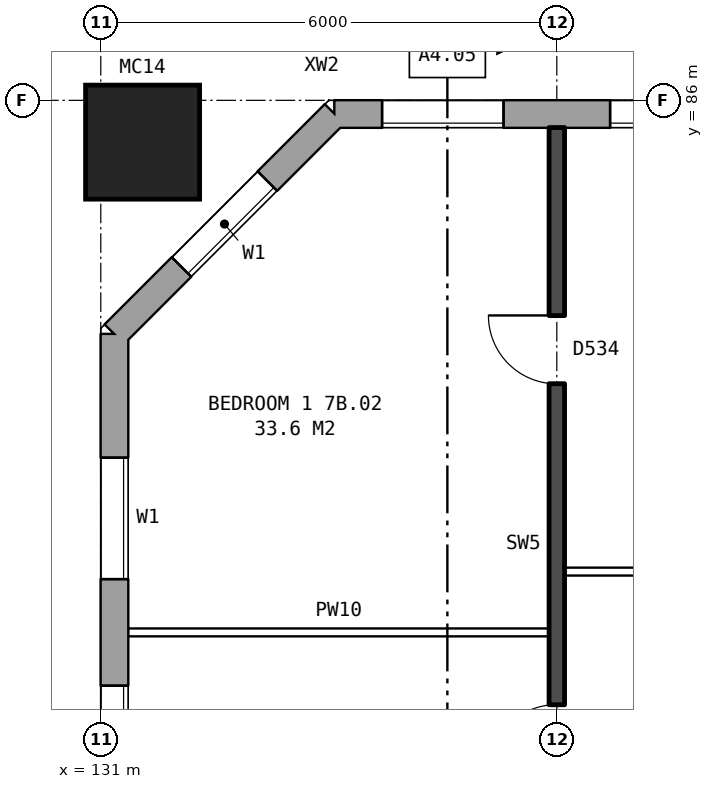
"""IFC4 building model, lengths in metres.
Left out: names, types, materials, properties, quantities, classifications, styles, units other than length and angle.
Written with IfcOpenShell. Run it as: python <this file> out.ifc"""

import sys

from ifc_helpers import new_model, si_unit, direction, frame, frame_2d, origin, origin_2d, place, context, subcontext, project, spatial, rectangle, hollow_rectangle, extrude, element, fill, save


model = new_model("IFC4")
c1 = context("Model", 3, precision=1e-05, world=origin(), true_north=direction((0.0, 1.0)))
c2 = subcontext(c1, "Body", "Model", "MODEL_VIEW")
j1 = project(units=[si_unit("LENGTHUNIT", "METRE"), si_unit("PLANEANGLEUNIT", "RADIAN")], contexts=[c1])
p1 = place(None, origin())
s1 = spatial("IfcSite", under=j1, at=p1, CompositionType="ELEMENT")
p2 = place(p1, origin())
s2 = spatial("IfcBuilding", under=s1, at=p2, CompositionType="ELEMENT")
p3 = place(p2, frame((0.0, 0.0, 28.8)))
s3 = spatial("IfcBuildingStorey", under=s2, at=p3, CompositionType="ELEMENT", Elevation=28.8)
p4 = place(p3, frame((131.55, 85.45, 0.0), z_axis=(0.0, 0.0, 1.0), x_axis=(1.0, 0.0, 0.0)))
e1 = element("IfcColumn", 1, at=p4, inside=s3, PredefinedType="COLUMN", context=c2, shape_type="SweptSolid", body=[
    extrude(hollow_rectangle(XDim=1.5, YDim=1.5, WallThickness=0.08, at=origin_2d()), origin(), (0.0, 0.0, 1.0), 3.1),
])
p5 = place(p3, frame((174.675, 85.82, 0.0), z_axis=(0.0, 0.0, 1.0), x_axis=(-1.0, 0.0, 0.0)))
e2 = element("IfcWall", 2, at=p5, inside=s3, PredefinedType="STANDARD", context=c2, shape_type="SweptSolid", body=[
    extrude(rectangle(XDim=40.601, YDim=0.36, at=frame_2d((20.3, 0.0))), origin(), (0.0, 0.0, 1.0), 2.85),
])
p6 = place(p5, frame((2.375, 0.0, 0.8)))
e3 = element("IfcOpeningElement", 3, at=p6, cuts=e2, PredefinedType="OPENING", context=c2, shape_type="SweptSolid", body=[
    extrude(rectangle(XDim=1.6, YDim=1.8, at=frame_2d((0.8, 0.9))), frame((0.0, 0.19, 0.0), z_axis=(0.0, -1.0, 0.0), x_axis=(1.0, 0.0, 0.0)), (0.0, 0.0, 1.0), 0.38),
])
p7 = place(p5, frame((5.375, 0.0, 0.8)))
e4 = element("IfcOpeningElement", 4, at=p7, cuts=e2, PredefinedType="OPENING", context=c2, shape_type="SweptSolid", body=[
    extrude(rectangle(XDim=1.6, YDim=1.8, at=frame_2d((0.8, 0.9))), frame((0.0, 0.19, 0.0), z_axis=(0.0, -1.0, 0.0), x_axis=(1.0, 0.0, 0.0)), (0.0, 0.0, 1.0), 0.38),
])
p8 = place(p5, frame((7.875, 0.0, 0.8)))
e5 = element("IfcOpeningElement", 5, at=p8, cuts=e2, PredefinedType="OPENING", context=c2, shape_type="SweptSolid", body=[
    extrude(rectangle(XDim=1.6, YDim=1.8, at=frame_2d((0.8, 0.9))), frame((0.0, 0.19, 0.0), z_axis=(0.0, -1.0, 0.0), x_axis=(1.0, 0.0, 0.0)), (0.0, 0.0, 1.0), 0.38),
])
p9 = place(p5, frame((9.775, 0.0, 1.7)))
e6 = element("IfcOpeningElement", 6, at=p9, cuts=e2, PredefinedType="OPENING", context=c2, shape_type="SweptSolid", body=[
    extrude(rectangle(XDim=0.8, YDim=0.9, at=frame_2d((0.4, 0.45))), frame((0.0, 0.19, 0.0), z_axis=(0.0, -1.0, 0.0), x_axis=(1.0, 0.0, 0.0)), (0.0, 0.0, 1.0), 0.38),
])
p10 = place(p5, frame((14.375, 0.0, 0.8)))
e7 = element("IfcOpeningElement", 7, at=p10, cuts=e2, PredefinedType="OPENING", context=c2, shape_type="SweptSolid", body=[
    extrude(rectangle(XDim=1.6, YDim=1.8, at=frame_2d((0.8, 0.9))), frame((0.0, 0.19, 0.0), z_axis=(0.0, -1.0, 0.0), x_axis=(1.0, 0.0, 0.0)), (0.0, 0.0, 1.0), 0.38),
])
p11 = place(p5, frame((17.375, 0.0, 0.8)))
e8 = element("IfcOpeningElement", 8, at=p11, cuts=e2, PredefinedType="OPENING", context=c2, shape_type="SweptSolid", body=[
    extrude(rectangle(XDim=1.6, YDim=1.8, at=frame_2d((0.8, 0.9))), frame((0.0, 0.19, 0.0), z_axis=(0.0, -1.0, 0.0), x_axis=(1.0, 0.0, 0.0)), (0.0, 0.0, 1.0), 0.38),
])
p12 = place(p5, frame((20.375, 0.0, 0.8)))
e9 = element("IfcOpeningElement", 9, at=p12, cuts=e2, PredefinedType="OPENING", context=c2, shape_type="SweptSolid", body=[
    extrude(rectangle(XDim=1.6, YDim=1.8, at=frame_2d((0.8, 0.9))), frame((0.0, 0.19, 0.0), z_axis=(0.0, -1.0, 0.0), x_axis=(1.0, 0.0, 0.0)), (0.0, 0.0, 1.0), 0.38),
])
p13 = place(p5, frame((23.375, 0.0, 0.8)))
e10 = element("IfcOpeningElement", 10, at=p13, cuts=e2, PredefinedType="OPENING", context=c2, shape_type="SweptSolid", body=[
    extrude(rectangle(XDim=1.6, YDim=1.8, at=frame_2d((0.8, 0.9))), frame((0.0, 0.19, 0.0), z_axis=(0.0, -1.0, 0.0), x_axis=(1.0, 0.0, 0.0)), (0.0, 0.0, 1.0), 0.38),
])
p14 = place(p5, frame((25.875, 0.0, 0.8)))
e11 = element("IfcOpeningElement", 11, at=p14, cuts=e2, PredefinedType="OPENING", context=c2, shape_type="SweptSolid", body=[
    extrude(rectangle(XDim=1.6, YDim=1.8, at=frame_2d((0.8, 0.9))), frame((0.0, 0.19, 0.0), z_axis=(0.0, -1.0, 0.0), x_axis=(1.0, 0.0, 0.0)), (0.0, 0.0, 1.0), 0.38),
])
p15 = place(p5, frame((28.825, 0.0, 0.15)))
e12 = element("IfcOpeningElement", 12, at=p15, cuts=e2, PredefinedType="OPENING", context=c2, shape_type="SweptSolid", body=[
    extrude(rectangle(XDim=0.6, YDim=0.9, at=frame_2d((0.3, 0.45))), frame((0.0, 0.19, 0.0), z_axis=(0.0, -1.0, 0.0), x_axis=(1.0, 0.0, 0.0)), (0.0, 0.0, 1.0), 0.38),
])
p16 = place(p5, frame((32.375, 0.0, 0.8)))
e13 = element("IfcOpeningElement", 13, at=p16, cuts=e2, PredefinedType="OPENING", context=c2, shape_type="SweptSolid", body=[
    extrude(rectangle(XDim=1.6, YDim=1.8, at=frame_2d((0.8, 0.9))), frame((0.0, 0.19, 0.0), z_axis=(0.0, -1.0, 0.0), x_axis=(1.0, 0.0, 0.0)), (0.0, 0.0, 1.0), 0.38),
])
p17 = place(p5, frame((35.375, 0.0, 0.8)))
e14 = element("IfcOpeningElement", 14, at=p17, cuts=e2, PredefinedType="OPENING", context=c2, shape_type="SweptSolid", body=[
    extrude(rectangle(XDim=1.6, YDim=1.8, at=frame_2d((0.8, 0.9))), frame((0.0, 0.19, 0.0), z_axis=(0.0, -1.0, 0.0), x_axis=(1.0, 0.0, 0.0)), (0.0, 0.0, 1.0), 0.38),
])
p18 = place(p5, frame((38.375, 0.0, 0.8)))
e15 = element("IfcOpeningElement", 15, at=p18, cuts=e2, PredefinedType="OPENING", context=c2, shape_type="SweptSolid", body=[
    extrude(rectangle(XDim=1.6, YDim=1.8, at=frame_2d((0.8, 0.9))), frame((0.0, 0.19, 0.0), z_axis=(0.0, -1.0, 0.0), x_axis=(1.0, 0.0, 0.0)), (0.0, 0.0, 1.0), 0.38),
])
p19 = place(p5, frame((12.275, 0.0, 0.8)))
e16 = element("IfcOpeningElement", 16, at=p19, cuts=e2, PredefinedType="OPENING", context=c2, shape_type="SweptSolid", body=[
    extrude(rectangle(XDim=1.2, YDim=1.2, at=frame_2d((0.6, 0.6))), frame((0.0, 0.19, 0.0), z_axis=(0.0, -1.0, 0.0), x_axis=(1.0, 0.0, 0.0)), (0.0, 0.0, 1.0), 0.38),
])
p20 = place(p5, frame((27.775, 0.0, 0.8)))
e17 = element("IfcOpeningElement", 17, at=p20, cuts=e2, PredefinedType="OPENING", context=c2, shape_type="SweptSolid", body=[
    extrude(rectangle(XDim=0.6, YDim=0.9, at=frame_2d((0.3, 0.45))), frame((0.0, 0.19, 0.0), z_axis=(0.0, -1.0, 0.0), x_axis=(1.0, 0.0, 0.0)), (0.0, 0.0, 1.0), 0.38),
])
p21 = place(p5, frame((30.025, 0.0, 1.65)))
e18 = element("IfcOpeningElement", 18, at=p21, cuts=e2, PredefinedType="OPENING", context=c2, shape_type="SweptSolid", body=[
    extrude(rectangle(XDim=1.4, YDim=0.9, at=frame_2d((0.7, 0.45))), frame((0.0, 0.19, 0.0), z_axis=(0.0, -1.0, 0.0), x_axis=(1.0, 0.0, 0.0)), (0.0, 0.0, 1.0), 0.38),
])
p22 = place(p3, frame((134.075, 85.82, 0.0), z_axis=(0.0, 0.0, 1.0), x_axis=(-0.707106781187, -0.707106781187, 0.0)))
e19 = element("IfcWall", 19, at=p22, inside=s3, PredefinedType="STANDARD", context=c2, shape_type="SweptSolid", body=[
    extrude(rectangle(XDim=4.094, YDim=0.36, at=frame_2d((2.047, 0.0))), origin(), (0.0, 0.0, 1.0), 2.85),
])
p23 = place(p22, frame((1.247, 0.0, 0.8)))
e20 = element("IfcOpeningElement", 20, at=p23, cuts=e19, PredefinedType="OPENING", context=c2, shape_type="SweptSolid", body=[
    extrude(rectangle(XDim=1.6, YDim=1.8, at=frame_2d((0.8, 0.9))), frame((0.0, 0.19, 0.0), z_axis=(0.0, -1.0, 0.0), x_axis=(1.0, 0.0, 0.0)), (0.0, 0.0, 1.0), 0.38),
])
p24 = place(p3, frame((131.18, 82.925, 0.0), z_axis=(0.0, 0.0, 1.0), x_axis=(0.0, -1.0, 0.0)))
e21 = element("IfcWall", 21, at=p24, inside=s3, PredefinedType="STANDARD", context=c2, shape_type="SweptSolid", body=[
    extrude(rectangle(XDim=25.851, YDim=0.36, at=frame_2d((12.925, 0.0))), origin(), (0.0, 0.0, 1.0), 2.85),
])
p25 = place(p24, frame((1.625, 0.0, 0.8)))
e22 = element("IfcOpeningElement", 22, at=p25, cuts=e21, PredefinedType="OPENING", context=c2, shape_type="SweptSolid", body=[
    extrude(rectangle(XDim=1.6, YDim=1.8, at=frame_2d((0.8, 0.9))), frame((0.0, 0.19, 0.0), z_axis=(0.0, -1.0, 0.0), x_axis=(1.0, 0.0, 0.0)), (0.0, 0.0, 1.0), 0.38),
])
p26 = place(p24, frame((4.625, 0.0, 0.8)))
e23 = element("IfcOpeningElement", 23, at=p26, cuts=e21, PredefinedType="OPENING", context=c2, shape_type="SweptSolid", body=[
    extrude(rectangle(XDim=1.6, YDim=1.8, at=frame_2d((0.8, 0.9))), frame((0.0, 0.19, 0.0), z_axis=(0.0, -1.0, 0.0), x_axis=(1.0, 0.0, 0.0)), (0.0, 0.0, 1.0), 0.38),
])
p27 = place(p24, frame((19.625, 0.0, 0.8)))
e24 = element("IfcOpeningElement", 24, at=p27, cuts=e21, PredefinedType="OPENING", context=c2, shape_type="SweptSolid", body=[
    extrude(rectangle(XDim=1.6, YDim=1.8, at=frame_2d((0.8, 0.9))), frame((0.0, 0.19, 0.0), z_axis=(0.0, -1.0, 0.0), x_axis=(1.0, 0.0, 0.0)), (0.0, 0.0, 1.0), 0.38),
])
p28 = place(p24, frame((22.625, 0.0, 0.8)))
e25 = element("IfcOpeningElement", 25, at=p28, cuts=e21, PredefinedType="OPENING", context=c2, shape_type="SweptSolid", body=[
    extrude(rectangle(XDim=1.6, YDim=1.8, at=frame_2d((0.8, 0.9))), frame((0.0, 0.19, 0.0), z_axis=(0.0, -1.0, 0.0), x_axis=(1.0, 0.0, 0.0)), (0.0, 0.0, 1.0), 0.38),
])
p29 = place(p3, frame((131.36, 79.0, 0.0), z_axis=(0.0, 0.0, 1.0), x_axis=(1.0, 0.0, 0.0)))
e26 = element("IfcWall", 26, at=p29, inside=s3, PredefinedType="PARTITIONING", context=c2, shape_type="SweptSolid", body=[
    extrude(rectangle(XDim=5.54, YDim=0.1, at=frame_2d((2.77, 0.0))), origin(), (0.0, 0.0, 1.0), 2.85),
])
p30 = place(p3, frame((137.1, 79.8, 0.0), z_axis=(0.0, 0.0, 1.0), x_axis=(1.0, 0.0, 0.0)))
e27 = element("IfcWall", 27, at=p30, inside=s3, PredefinedType="PARTITIONING", context=c2, shape_type="SweptSolid", body=[
    extrude(rectangle(XDim=5.8, YDim=0.1, at=frame_2d((2.9, 0.0))), origin(), (0.0, 0.0, 1.0), 2.85),
])
p31 = place(p30, frame((1.3, 0.0, 0.0)))
e28 = element("IfcOpeningElement", 28, at=p31, cuts=e27, PredefinedType="OPENING", context=c2, shape_type="SweptSolid", body=[
    extrude(rectangle(XDim=0.9, YDim=2.1, at=frame_2d((0.45, 1.05))), frame((0.0, 0.06, 0.0), z_axis=(0.0, -1.0, 0.0), x_axis=(1.0, 0.0, 0.0)), (0.0, 0.0, 1.0), 0.12),
])
p32 = place(p30, frame((4.2, 0.0, 0.0)))
e29 = element("IfcOpeningElement", 29, at=p32, cuts=e27, PredefinedType="OPENING", context=c2, shape_type="SweptSolid", body=[
    extrude(rectangle(XDim=0.9, YDim=2.1, at=frame_2d((0.45, 1.05))), frame((0.0, 0.06, 0.0), z_axis=(0.0, -1.0, 0.0), x_axis=(1.0, 0.0, 0.0)), (0.0, 0.0, 1.0), 0.12),
])
p33 = place(p3, frame((137.0, 76.2, 0.0), z_axis=(0.0, 0.0, 1.0), x_axis=(0.0, 1.0, 0.0)))
e30 = element("IfcWall", 30, at=p33, inside=s3, PredefinedType="SOLIDWALL", context=c2, shape_type="SweptSolid", body=[
    extrude(rectangle(XDim=9.44, YDim=0.2, at=frame_2d((4.72, 0.0))), origin(), (0.0, 0.0, 1.0), 2.85),
])
p34 = place(p33, frame((6.07, 0.0, 0.0)))
e31 = element("IfcOpeningElement", 31, at=p34, cuts=e30, PredefinedType="OPENING", context=c2, shape_type="SweptSolid", body=[
    extrude(rectangle(XDim=0.9, YDim=2.1, at=frame_2d((0.45, 1.05))), frame((0.0, 0.11, 0.0), z_axis=(0.0, -1.0, 0.0), x_axis=(1.0, 0.0, 0.0)), (0.0, 0.0, 1.0), 0.22),
])
p35 = place(p33, frame((0.95, 0.0, 0.0)))
e32 = element("IfcOpeningElement", 32, at=p35, cuts=e30, PredefinedType="OPENING", context=c2, shape_type="SweptSolid", body=[
    extrude(rectangle(XDim=0.9, YDim=2.1, at=frame_2d((0.45, 1.05))), frame((0.0, 0.11, 0.0), z_axis=(0.0, -1.0, 0.0), x_axis=(1.0, 0.0, 0.0)), (0.0, 0.0, 1.0), 0.22),
])
p36 = place(p17, origin())
e33 = element("IfcWindow", 33, at=p36, inside=s3, PartitioningType="SINGLE_PANEL", PredefinedType="WINDOW", context=c2, shape_type="SweptSolid", body=[
    extrude(rectangle(XDim=1.6, YDim=1.8, at=frame_2d((0.8, 0.9))), frame((0.0, 0.15, 0.0), z_axis=(0.0, -1.0, 0.0), x_axis=(1.0, 0.0, 0.0)), (0.0, 0.0, 1.0), 0.06),
])
fill(e14, e33)
p37 = place(p18, origin())
e34 = element("IfcWindow", 34, at=p37, inside=s3, PartitioningType="SINGLE_PANEL", PredefinedType="WINDOW", context=c2, shape_type="SweptSolid", body=[
    extrude(rectangle(XDim=1.6, YDim=1.8, at=frame_2d((0.8, 0.9))), frame((0.0, 0.15, 0.0), z_axis=(0.0, -1.0, 0.0), x_axis=(1.0, 0.0, 0.0)), (0.0, 0.0, 1.0), 0.06),
])
fill(e15, e34)
p38 = place(p23, origin())
e35 = element("IfcWindow", 35, at=p38, inside=s3, PartitioningType="SINGLE_PANEL", PredefinedType="WINDOW", context=c2, shape_type="SweptSolid", body=[
    extrude(rectangle(XDim=1.6, YDim=1.8, at=frame_2d((0.8, 0.9))), frame((0.0, 0.15, 0.0), z_axis=(0.0, -1.0, 0.0), x_axis=(1.0, 0.0, 0.0)), (0.0, 0.0, 1.0), 0.06),
])
fill(e20, e35)
p39 = place(p25, origin())
e36 = element("IfcWindow", 36, at=p39, inside=s3, PartitioningType="SINGLE_PANEL", PredefinedType="WINDOW", context=c2, shape_type="SweptSolid", body=[
    extrude(rectangle(XDim=1.6, YDim=1.8, at=frame_2d((0.8, 0.9))), frame((0.0, 0.15, 0.0), z_axis=(0.0, -1.0, 0.0), x_axis=(1.0, 0.0, 0.0)), (0.0, 0.0, 1.0), 0.06),
])
fill(e22, e36)
p40 = place(p26, origin())
e37 = element("IfcWindow", 37, at=p40, inside=s3, PartitioningType="SINGLE_PANEL", PredefinedType="WINDOW", context=c2, shape_type="SweptSolid", body=[
    extrude(rectangle(XDim=1.6, YDim=1.8, at=frame_2d((0.8, 0.9))), frame((0.0, 0.15, 0.0), z_axis=(0.0, -1.0, 0.0), x_axis=(1.0, 0.0, 0.0)), (0.0, 0.0, 1.0), 0.06),
])
fill(e23, e37)
p41 = place(p34, origin())
e38 = element("IfcDoor", 38, at=p41, inside=s3, OperationType="SINGLE_SWING_RIGHT", PredefinedType="DOOR", context=c2, shape_type="SweptSolid", body=[
    extrude(rectangle(XDim=0.9, YDim=2.1, at=frame_2d((0.45, 1.05))), frame((0.0, 0.025, 0.0), z_axis=(0.0, -1.0, 0.0), x_axis=(1.0, 0.0, 0.0)), (0.0, 0.0, 1.0), 0.05),
])
fill(e31, e38)
p42 = place(p35, origin())
e39 = element("IfcDoor", 39, at=p42, inside=s3, OperationType="SINGLE_SWING_LEFT", PredefinedType="DOOR", context=c2, shape_type="SweptSolid", body=[
    extrude(rectangle(XDim=0.9, YDim=2.1, at=frame_2d((0.45, 1.05))), frame((0.0, 0.025, 0.0), z_axis=(0.0, -1.0, 0.0), x_axis=(1.0, 0.0, 0.0)), (0.0, 0.0, 1.0), 0.05),
])
fill(e32, e39)
save(model, sys.argv[1])
